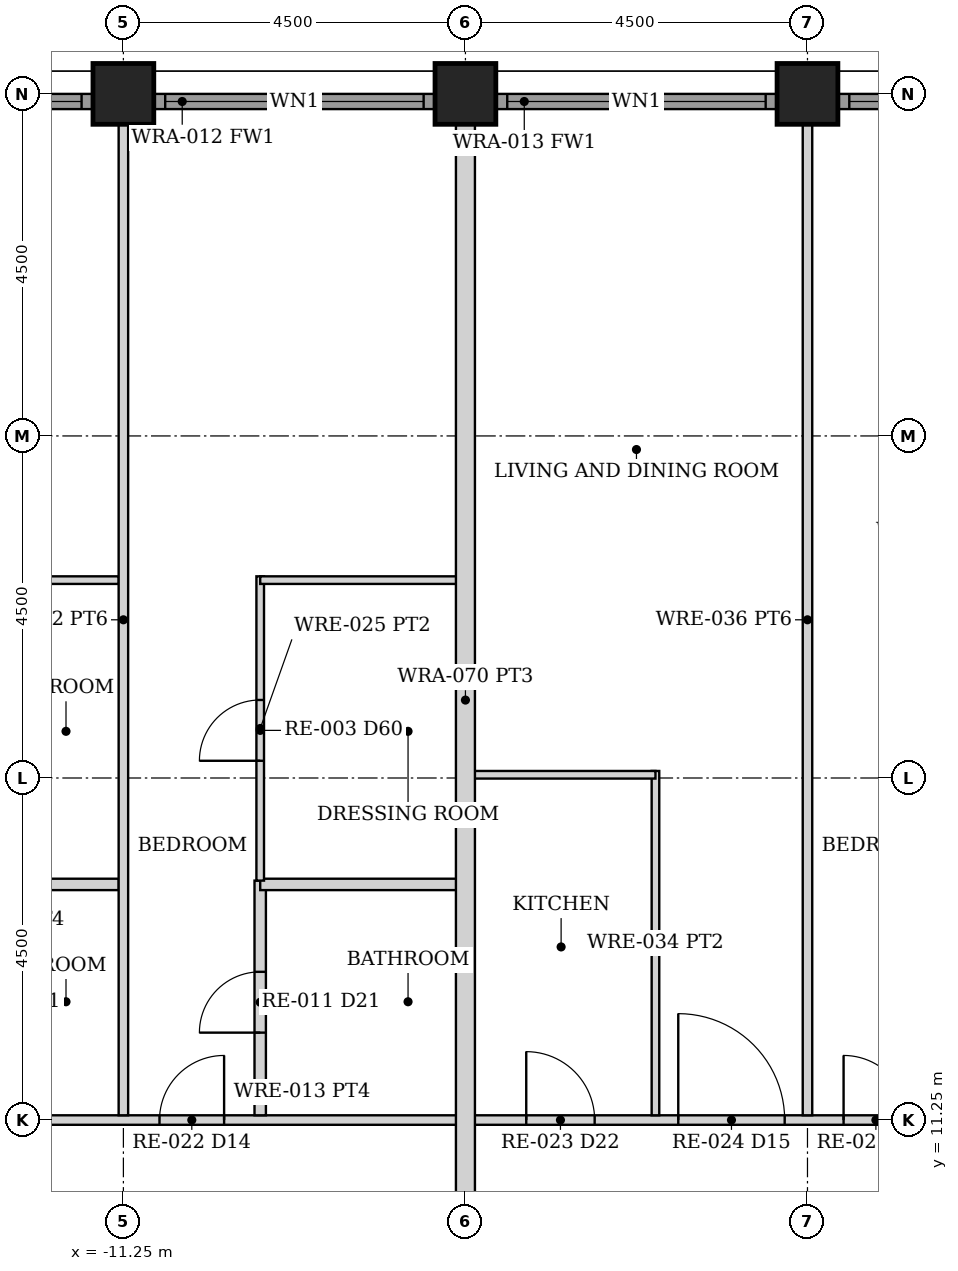
"""IFC4 building model, lengths in metres.
Left out: names, types, materials, properties, quantities, classifications, styles, units other than length and angle.
Written with IfcOpenShell. Run it as: python <this file> out.ifc"""

import sys

from ifc_helpers import new_model, si_unit, direction, frame, frame_2d, origin, origin_2d, place, context, subcontext, project, spatial, rectangle, hollow_rectangle, extrude, element, fill, save


model = new_model("IFC4")
c1 = context("Model", 3, precision=1e-05, world=origin(), true_north=direction((0.0, 1.0)))
c2 = subcontext(c1, "Body", "Model", "MODEL_VIEW")
j1 = project(units=[si_unit("LENGTHUNIT", "METRE"), si_unit("PLANEANGLEUNIT", "RADIAN")], contexts=[c1])
p1 = place(None, origin())
s1 = spatial("IfcSite", under=j1, at=p1, CompositionType="ELEMENT")
p2 = place(p1, origin())
s2 = spatial("IfcBuilding", under=s1, at=p2, CompositionType="ELEMENT")
p3 = place(p2, frame((0.0, 0.0, 68.5)))
s3 = spatial("IfcBuildingStorey", under=s2, at=p3, CompositionType="ELEMENT", Elevation=68.5)
for number, where, z_axis, x_axis in (
    (1, (-11.25, 24.75, 0.0), (0.0, 0.0, 1.0), (0.0, 1.0, 0.0)),
    (2, (-6.75, 24.75, 0.0), (0.0, 0.0, 1.0), (0.0, 1.0, 0.0)),
    (3, (-2.25, 24.75, 0.0), (0.0, 0.0, 1.0), (0.0, 1.0, 0.0)),
):
    element("IfcColumn", number, at=place(p3, frame(where, z_axis=z_axis, x_axis=x_axis)), inside=s3, PredefinedType="COLUMN", context=c2, shape_type="SweptSolid", body=[
        extrude(hollow_rectangle(XDim=0.8, YDim=0.8, WallThickness=0.06, at=origin_2d()), origin(), (0.0, 0.0, 1.0), 3.5),
    ])
p4 = place(p3, frame((-15.345, 24.65, 0.0), z_axis=(0.0, 0.0, 1.0), x_axis=(1.0, 0.0, 0.0)))
e4 = element("IfcWall", 4, at=p4, inside=s3, PredefinedType="SOLIDWALL", context=c2, shape_type="SweptSolid", body=[
    extrude(rectangle(XDim=3.69, YDim=0.2, at=frame_2d((1.845, 0.0))), origin(), (0.0, 0.0, 1.0), 2.379),
])
p5 = place(p4, frame((0.145, 0.0, 0.3)))
e5 = element("IfcOpeningElement", 5, at=p5, cuts=e4, PredefinedType="OPENING", context=c2, shape_type="SweptSolid", body=[
    extrude(rectangle(XDim=3.4, YDim=1.929, at=frame_2d((1.7, 0.964))), frame((0.0, 0.11, 0.0), z_axis=(0.0, -1.0, 0.0), x_axis=(1.0, 0.0, 0.0)), (0.0, 0.0, 1.0), 0.22),
])
p6 = place(p3, frame((-10.845, 24.65, 0.0), z_axis=(0.0, 0.0, 1.0), x_axis=(1.0, 0.0, 0.0)))
e6 = element("IfcWall", 6, at=p6, inside=s3, PredefinedType="SOLIDWALL", context=c2, shape_type="SweptSolid", body=[
    extrude(rectangle(XDim=3.69, YDim=0.2, at=frame_2d((1.845, 0.0))), origin(), (0.0, 0.0, 1.0), 2.379),
])
p7 = place(p6, frame((0.145, 0.0, 0.3)))
e7 = element("IfcOpeningElement", 7, at=p7, cuts=e6, PredefinedType="OPENING", context=c2, shape_type="SweptSolid", body=[
    extrude(rectangle(XDim=3.4, YDim=1.929, at=frame_2d((1.7, 0.964))), frame((0.0, 0.11, 0.0), z_axis=(0.0, -1.0, 0.0), x_axis=(1.0, 0.0, 0.0)), (0.0, 0.0, 1.0), 0.22),
])
p8 = place(p3, frame((-6.345, 24.65, 0.0), z_axis=(0.0, 0.0, 1.0), x_axis=(1.0, 0.0, 0.0)))
e8 = element("IfcWall", 8, at=p8, inside=s3, PredefinedType="SOLIDWALL", context=c2, shape_type="SweptSolid", body=[
    extrude(rectangle(XDim=3.69, YDim=0.2, at=frame_2d((1.845, 0.0))), origin(), (0.0, 0.0, 1.0), 2.379),
])
p9 = place(p8, frame((0.145, 0.0, 0.3)))
e9 = element("IfcOpeningElement", 9, at=p9, cuts=e8, PredefinedType="OPENING", context=c2, shape_type="SweptSolid", body=[
    extrude(rectangle(XDim=3.4, YDim=1.929, at=frame_2d((1.7, 0.964))), frame((0.0, 0.11, 0.0), z_axis=(0.0, -1.0, 0.0), x_axis=(1.0, 0.0, 0.0)), (0.0, 0.0, 1.0), 0.22),
])
p10 = place(p3, frame((-1.845, 24.65, 0.0), z_axis=(0.0, 0.0, 1.0), x_axis=(1.0, 0.0, 0.0)))
e10 = element("IfcWall", 10, at=p10, inside=s3, PredefinedType="SOLIDWALL", context=c2, shape_type="SweptSolid", body=[
    extrude(rectangle(XDim=3.69, YDim=0.2, at=frame_2d((1.845, 0.0))), origin(), (0.0, 0.0, 1.0), 2.379),
])
p11 = place(p10, frame((0.145, 0.0, 0.3)))
e11 = element("IfcOpeningElement", 11, at=p11, cuts=e10, PredefinedType="OPENING", context=c2, shape_type="SweptSolid", body=[
    extrude(rectangle(XDim=3.4, YDim=1.929, at=frame_2d((1.7, 0.964))), frame((0.0, 0.11, 0.0), z_axis=(0.0, -1.0, 0.0), x_axis=(1.0, 0.0, 0.0)), (0.0, 0.0, 1.0), 0.22),
])
p12 = place(p3, frame((-24.35, 11.25, 0.0), z_axis=(0.0, 0.0, 1.0), x_axis=(1.0, 0.0, 0.0)))
e12 = element("IfcWall", 12, at=p12, inside=s3, PredefinedType="PARTITIONING", context=c2, shape_type="SweptSolid", body=[
    extrude(rectangle(XDim=17.5, YDim=0.125, at=frame_2d((8.75, 0.0))), origin(), (0.0, 0.0, 1.0), 2.373),
])
p13 = place(p12, frame((2.625, 0.0, 0.0)))
e13 = element("IfcOpeningElement", 13, at=p13, cuts=e12, PredefinedType="OPENING", context=c2, shape_type="SweptSolid", body=[
    extrude(rectangle(XDim=0.9, YDim=2.1, at=frame_2d((0.45, 1.05))), frame((0.0, 0.073, 0.0), z_axis=(0.0, -1.0, 0.0), x_axis=(1.0, 0.0, 0.0)), (0.0, 0.0, 1.0), 0.145),
])
p14 = place(p12, frame((0.35, 0.0, 0.0)))
e14 = element("IfcOpeningElement", 14, at=p14, cuts=e12, PredefinedType="OPENING", context=c2, shape_type="SweptSolid", body=[
    extrude(rectangle(XDim=1.4, YDim=2.1, at=frame_2d((0.7, 1.05))), frame((0.0, 0.073, 0.0), z_axis=(0.0, -1.0, 0.0), x_axis=(1.0, 0.0, 0.0)), (0.0, 0.0, 1.0), 0.145),
])
p15 = place(p12, frame((4.575, 0.0, 0.0)))
e15 = element("IfcOpeningElement", 15, at=p15, cuts=e12, PredefinedType="OPENING", context=c2, shape_type="SweptSolid", body=[
    extrude(rectangle(XDim=0.85, YDim=2.1, at=frame_2d((0.425, 1.05))), frame((0.0, 0.073, 0.0), z_axis=(0.0, -1.0, 0.0), x_axis=(1.0, 0.0, 0.0)), (0.0, 0.0, 1.0), 0.145),
])
p16 = place(p12, frame((6.77, 0.0, 0.0)))
e16 = element("IfcOpeningElement", 16, at=p16, cuts=e12, PredefinedType="OPENING", context=c2, shape_type="SweptSolid", body=[
    extrude(rectangle(XDim=0.9, YDim=2.1, at=frame_2d((0.45, 1.05))), frame((0.0, 0.073, 0.0), z_axis=(0.0, -1.0, 0.0), x_axis=(1.0, 0.0, 0.0)), (0.0, 0.0, 1.0), 0.145),
])
p17 = place(p12, frame((9.075, 0.0, 0.0)))
e17 = element("IfcOpeningElement", 17, at=p17, cuts=e12, PredefinedType="OPENING", context=c2, shape_type="SweptSolid", body=[
    extrude(rectangle(XDim=0.85, YDim=2.1, at=frame_2d((0.425, 1.05))), frame((0.0, 0.073, 0.0), z_axis=(0.0, -1.0, 0.0), x_axis=(1.0, 0.0, 0.0)), (0.0, 0.0, 1.0), 0.145),
])
p18 = place(p12, frame((13.575, 0.0, 0.0)))
e18 = element("IfcOpeningElement", 18, at=p18, cuts=e12, PredefinedType="OPENING", context=c2, shape_type="SweptSolid", body=[
    extrude(rectangle(XDim=0.85, YDim=2.1, at=frame_2d((0.425, 1.05))), frame((0.0, 0.073, 0.0), z_axis=(0.0, -1.0, 0.0), x_axis=(1.0, 0.0, 0.0)), (0.0, 0.0, 1.0), 0.145),
])
p19 = place(p3, frame((-13.95, 14.35, 0.0), z_axis=(0.0, 0.0, 1.0), x_axis=(1.0, 0.0, 0.0)))
e19 = element("IfcWall", 19, at=p19, inside=s3, PredefinedType="PARTITIONING", context=c2, shape_type="SweptSolid", body=[
    extrude(rectangle(XDim=2.64, YDim=0.15, at=frame_2d((1.32, 0.0))), origin(), (0.0, 0.0, 1.0), 2.373),
])
p20 = place(p3, frame((-13.95, 18.353, 0.0), z_axis=(0.0, 0.0, 1.0), x_axis=(1.0, 0.0, 0.0)))
e20 = element("IfcWall", 20, at=p20, inside=s3, PredefinedType="PARTITIONING", context=c2, shape_type="SweptSolid", body=[
    extrude(rectangle(XDim=2.64, YDim=0.1, at=frame_2d((1.32, 0.0))), origin(), (0.0, 0.0, 1.0), 2.373),
])
p21 = place(p3, frame((-11.25, 11.312, 0.0), z_axis=(0.0, 0.0, 1.0), x_axis=(0.0, 1.0, 0.0)))
e21 = element("IfcWall", 21, at=p21, inside=s3, PredefinedType="PARTITIONING", context=c2, shape_type="SweptSolid", body=[
    extrude(rectangle(XDim=13.038, YDim=0.125, at=frame_2d((6.519, 0.0))), origin(), (0.0, 0.0, 1.0), 2.373),
])
p22 = place(p3, frame((-9.45, 11.312, 0.0), z_axis=(0.0, 0.0, 1.0), x_axis=(0.0, 1.0, 0.0)))
e22 = element("IfcWall", 22, at=p22, inside=s3, PredefinedType="PARTITIONING", context=c2, shape_type="SweptSolid", body=[
    extrude(rectangle(XDim=3.087, YDim=0.15, at=frame_2d((1.544, 0.0))), origin(), (0.0, 0.0, 1.0), 2.373),
])
p23 = place(p22, frame((1.087, 0.0, 0.0)))
e23 = element("IfcOpeningElement", 23, at=p23, cuts=e22, PredefinedType="OPENING", context=c2, shape_type="SweptSolid", body=[
    extrude(rectangle(XDim=0.8, YDim=2.1, at=frame_2d((0.4, 1.05))), frame((0.0, 0.085, 0.0), z_axis=(0.0, -1.0, 0.0), x_axis=(1.0, 0.0, 0.0)), (0.0, 0.0, 1.0), 0.17),
])
p24 = place(p3, frame((-9.45, 14.35, 0.0), z_axis=(0.0, 0.0, 1.0), x_axis=(1.0, 0.0, 0.0)))
e24 = element("IfcWall", 24, at=p24, inside=s3, PredefinedType="PARTITIONING", context=c2, shape_type="SweptSolid", body=[
    extrude(rectangle(XDim=2.64, YDim=0.15, at=frame_2d((1.32, 0.0))), origin(), (0.0, 0.0, 1.0), 2.373),
])
p25 = place(p3, frame((-9.45, 14.4, 0.0), z_axis=(0.0, 0.0, 1.0), x_axis=(0.0, 1.0, 0.0)))
e25 = element("IfcWall", 25, at=p25, inside=s3, PredefinedType="PARTITIONING", context=c2, shape_type="SweptSolid", body=[
    extrude(rectangle(XDim=4.003, YDim=0.1, at=frame_2d((2.001, 0.0))), origin(), (0.0, 0.0, 1.0), 2.373),
])
p26 = place(p25, frame((1.576, 0.0, 0.0)))
e26 = element("IfcOpeningElement", 26, at=p26, cuts=e25, PredefinedType="OPENING", context=c2, shape_type="SweptSolid", body=[
    extrude(rectangle(XDim=0.8, YDim=2.1, at=frame_2d((0.4, 1.05))), frame((0.0, 0.06, 0.0), z_axis=(0.0, -1.0, 0.0), x_axis=(1.0, 0.0, 0.0)), (0.0, 0.0, 1.0), 0.12),
])
p27 = place(p3, frame((-9.45, 18.353, 0.0), z_axis=(0.0, 0.0, 1.0), x_axis=(1.0, 0.0, 0.0)))
e27 = element("IfcWall", 27, at=p27, inside=s3, PredefinedType="PARTITIONING", context=c2, shape_type="SweptSolid", body=[
    extrude(rectangle(XDim=2.64, YDim=0.1, at=frame_2d((1.32, 0.0))), origin(), (0.0, 0.0, 1.0), 2.373),
])
p28 = place(p3, frame((-6.65, 11.25, 0.0), z_axis=(0.0, 0.0, 1.0), x_axis=(1.0, 0.0, 0.0)))
e28 = element("IfcWall", 28, at=p28, inside=s3, PredefinedType="PARTITIONING", context=c2, shape_type="SweptSolid", body=[
    extrude(rectangle(XDim=13.3, YDim=0.125, at=frame_2d((6.65, 0.0))), origin(), (0.0, 0.0, 1.0), 2.373),
])
p29 = place(p28, frame((0.7, 0.0, 0.0)))
e29 = element("IfcOpeningElement", 29, at=p29, cuts=e28, PredefinedType="OPENING", context=c2, shape_type="SweptSolid", body=[
    extrude(rectangle(XDim=0.9, YDim=2.1, at=frame_2d((0.45, 1.05))), frame((0.0, 0.073, 0.0), z_axis=(0.0, -1.0, 0.0), x_axis=(1.0, 0.0, 0.0)), (0.0, 0.0, 1.0), 0.145),
])
p30 = place(p28, frame((2.7, 0.0, 0.0)))
e30 = element("IfcOpeningElement", 30, at=p30, cuts=e28, PredefinedType="OPENING", context=c2, shape_type="SweptSolid", body=[
    extrude(rectangle(XDim=1.4, YDim=2.1, at=frame_2d((0.7, 1.05))), frame((0.0, 0.073, 0.0), z_axis=(0.0, -1.0, 0.0), x_axis=(1.0, 0.0, 0.0)), (0.0, 0.0, 1.0), 0.145),
])
p31 = place(p28, frame((4.875, 0.0, 0.0)))
e31 = element("IfcOpeningElement", 31, at=p31, cuts=e28, PredefinedType="OPENING", context=c2, shape_type="SweptSolid", body=[
    extrude(rectangle(XDim=0.85, YDim=2.1, at=frame_2d((0.425, 1.05))), frame((0.0, 0.073, 0.0), z_axis=(0.0, -1.0, 0.0), x_axis=(1.0, 0.0, 0.0)), (0.0, 0.0, 1.0), 0.145),
])
p32 = place(p28, frame((7.07, 0.0, 0.0)))
e32 = element("IfcOpeningElement", 32, at=p32, cuts=e28, PredefinedType="OPENING", context=c2, shape_type="SweptSolid", body=[
    extrude(rectangle(XDim=0.9, YDim=2.1, at=frame_2d((0.45, 1.05))), frame((0.0, 0.073, 0.0), z_axis=(0.0, -1.0, 0.0), x_axis=(1.0, 0.0, 0.0)), (0.0, 0.0, 1.0), 0.145),
])
p33 = place(p28, frame((9.375, 0.0, 0.0)))
e33 = element("IfcOpeningElement", 33, at=p33, cuts=e28, PredefinedType="OPENING", context=c2, shape_type="SweptSolid", body=[
    extrude(rectangle(XDim=0.85, YDim=2.1, at=frame_2d((0.425, 1.05))), frame((0.0, 0.073, 0.0), z_axis=(0.0, -1.0, 0.0), x_axis=(1.0, 0.0, 0.0)), (0.0, 0.0, 1.0), 0.145),
])
p34 = place(p3, frame((-4.25, 11.312, 0.0), z_axis=(0.0, 0.0, 1.0), x_axis=(0.0, 1.0, 0.0)))
e34 = element("IfcWall", 34, at=p34, inside=s3, PredefinedType="PARTITIONING", context=c2, shape_type="SweptSolid", body=[
    extrude(rectangle(XDim=4.53, YDim=0.1, at=frame_2d((2.265, 0.0))), origin(), (0.0, 0.0, 1.0), 2.373),
])
p35 = place(p3, frame((-6.683, 15.792, 0.0), z_axis=(0.0, 0.0, 1.0), x_axis=(1.0, 0.0, 0.0)))
e35 = element("IfcWall", 35, at=p35, inside=s3, PredefinedType="PARTITIONING", context=c2, shape_type="SweptSolid", body=[
    extrude(rectangle(XDim=2.433, YDim=0.1, at=frame_2d((1.216, 0.0))), origin(), (0.0, 0.0, 1.0), 2.373),
])
p36 = place(p3, frame((-2.25, 11.312, 0.0), z_axis=(0.0, 0.0, 1.0), x_axis=(0.0, 1.0, 0.0)))
e36 = element("IfcWall", 36, at=p36, inside=s3, PredefinedType="PARTITIONING", context=c2, shape_type="SweptSolid", body=[
    extrude(rectangle(XDim=13.038, YDim=0.125, at=frame_2d((6.519, 0.0))), origin(), (0.0, 0.0, 1.0), 2.373),
])
p37 = place(p3, frame((-6.75, 9.2, 0.0), z_axis=(0.0, 0.0, 1.0), x_axis=(0.0, 1.0, 0.0)))
e37 = element("IfcWall", 37, at=p37, inside=s3, PredefinedType="PARTITIONING", context=c2, shape_type="SweptSolid", body=[
    extrude(rectangle(XDim=15.15, YDim=0.25, at=frame_2d((7.575, 0.0))), origin(), (0.0, 0.0, 1.0), 2.373),
])
p38 = place(p5, origin())
e38 = element("IfcWindow", 38, at=p38, inside=s3, PartitioningType="SINGLE_PANEL", PredefinedType="WINDOW", context=c2, shape_type="SweptSolid", body=[
    extrude(rectangle(XDim=3.4, YDim=1.929, at=frame_2d((1.7, 0.964))), frame((0.0, 0.03, 0.0), z_axis=(0.0, -1.0, 0.0), x_axis=(1.0, 0.0, 0.0)), (0.0, 0.0, 1.0), 0.06),
])
fill(e5, e38)
p39 = place(p7, origin())
e39 = element("IfcWindow", 39, at=p39, inside=s3, PartitioningType="SINGLE_PANEL", PredefinedType="WINDOW", context=c2, shape_type="SweptSolid", body=[
    extrude(rectangle(XDim=3.4, YDim=1.929, at=frame_2d((1.7, 0.964))), frame((0.0, 0.03, 0.0), z_axis=(0.0, -1.0, 0.0), x_axis=(1.0, 0.0, 0.0)), (0.0, 0.0, 1.0), 0.06),
])
fill(e7, e39)
p40 = place(p9, origin())
e40 = element("IfcWindow", 40, at=p40, inside=s3, PartitioningType="SINGLE_PANEL", PredefinedType="WINDOW", context=c2, shape_type="SweptSolid", body=[
    extrude(rectangle(XDim=3.4, YDim=1.929, at=frame_2d((1.7, 0.964))), frame((0.0, 0.03, 0.0), z_axis=(0.0, -1.0, 0.0), x_axis=(1.0, 0.0, 0.0)), (0.0, 0.0, 1.0), 0.06),
])
fill(e9, e40)
p41 = place(p11, origin())
e41 = element("IfcWindow", 41, at=p41, inside=s3, PartitioningType="SINGLE_PANEL", PredefinedType="WINDOW", context=c2, shape_type="SweptSolid", body=[
    extrude(rectangle(XDim=3.4, YDim=1.929, at=frame_2d((1.7, 0.964))), frame((0.0, 0.03, 0.0), z_axis=(0.0, -1.0, 0.0), x_axis=(1.0, 0.0, 0.0)), (0.0, 0.0, 1.0), 0.06),
])
fill(e11, e41)
p42 = place(p18, origin())
e42 = element("IfcDoor", 42, at=p42, inside=s3, OperationType="SINGLE_SWING_RIGHT", PredefinedType="DOOR", context=c2, shape_type="SweptSolid", body=[
    extrude(rectangle(XDim=0.85, YDim=2.1, at=frame_2d((0.425, 1.05))), frame((0.0, 0.025, 0.0), z_axis=(0.0, -1.0, 0.0), x_axis=(1.0, 0.0, 0.0)), (0.0, 0.0, 1.0), 0.05),
])
fill(e18, e42)
p43 = place(p23, origin())
e43 = element("IfcDoor", 43, at=p43, inside=s3, OperationType="SINGLE_SWING_LEFT", PredefinedType="DOOR", context=c2, shape_type="SweptSolid", body=[
    extrude(rectangle(XDim=0.8, YDim=2.1, at=frame_2d((0.4, 1.05))), frame((0.0, 0.025, 0.0), z_axis=(0.0, -1.0, 0.0), x_axis=(1.0, 0.0, 0.0)), (0.0, 0.0, 1.0), 0.05),
])
fill(e23, e43)
p44 = place(p26, origin())
e44 = element("IfcDoor", 44, at=p44, inside=s3, OperationType="SINGLE_SWING_LEFT", PredefinedType="DOOR", context=c2, shape_type="SweptSolid", body=[
    extrude(rectangle(XDim=0.8, YDim=2.1, at=frame_2d((0.4, 1.05))), frame((0.0, 0.025, 0.0), z_axis=(0.0, -1.0, 0.0), x_axis=(1.0, 0.0, 0.0)), (0.0, 0.0, 1.0), 0.05),
])
fill(e26, e44)
p45 = place(p29, origin())
e45 = element("IfcDoor", 45, at=p45, inside=s3, OperationType="SINGLE_SWING_LEFT", PredefinedType="DOOR", context=c2, shape_type="SweptSolid", body=[
    extrude(rectangle(XDim=0.9, YDim=2.1, at=frame_2d((0.45, 1.05))), frame((0.0, 0.025, 0.0), z_axis=(0.0, -1.0, 0.0), x_axis=(1.0, 0.0, 0.0)), (0.0, 0.0, 1.0), 0.05),
])
fill(e29, e45)
p46 = place(p30, origin())
e46 = element("IfcDoor", 46, at=p46, inside=s3, OperationType="SINGLE_SWING_LEFT", PredefinedType="DOOR", context=c2, shape_type="SweptSolid", body=[
    extrude(rectangle(XDim=1.4, YDim=2.1, at=frame_2d((0.7, 1.05))), frame((0.0, 0.025, 0.0), z_axis=(0.0, -1.0, 0.0), x_axis=(1.0, 0.0, 0.0)), (0.0, 0.0, 1.0), 0.05),
])
fill(e30, e46)
p47 = place(p31, origin())
e47 = element("IfcDoor", 47, at=p47, inside=s3, OperationType="SINGLE_SWING_LEFT", PredefinedType="DOOR", context=c2, shape_type="SweptSolid", body=[
    extrude(rectangle(XDim=0.85, YDim=2.1, at=frame_2d((0.425, 1.05))), frame((0.0, 0.025, 0.0), z_axis=(0.0, -1.0, 0.0), x_axis=(1.0, 0.0, 0.0)), (0.0, 0.0, 1.0), 0.05),
])
fill(e31, e47)
save(model, sys.argv[1])
